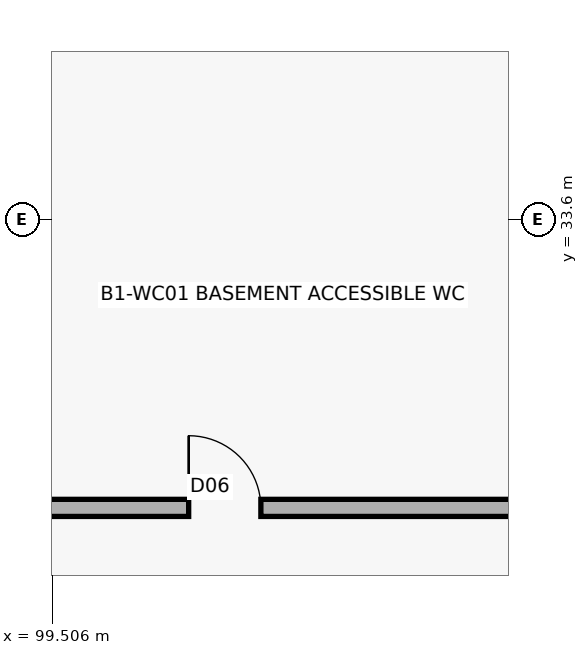
"""IFC4 building model, lengths in metres.
Left out: names, types, materials, properties, quantities, classifications, styles, units other than length and angle.
Written with IfcOpenShell. Run it as: python <this file> out.ifc"""

import sys

from ifc_helpers import new_model, si_unit, direction, frame, frame_2d, origin, place, context, subcontext, project, spatial, rectangle, extrude, element, fill, save


model = new_model("IFC4")
c1 = context("Model", 3, precision=1e-05, world=origin(), true_north=direction((0.0, 1.0)))
c2 = subcontext(c1, "Body", "Model", "MODEL_VIEW")
j1 = project(units=[si_unit("LENGTHUNIT", "METRE"), si_unit("PLANEANGLEUNIT", "RADIAN")], contexts=[c1])
p1 = place(None, origin())
s1 = spatial("IfcSite", under=j1, at=p1, CompositionType="ELEMENT")
p2 = place(p1, origin())
s2 = spatial("IfcBuilding", under=s1, at=p2, CompositionType="ELEMENT")
p3 = place(p2, frame((0.0, 0.0, -3.6)))
s3 = spatial("IfcBuildingStorey", under=s2, at=p3, CompositionType="ELEMENT", Elevation=-3.6)
p4 = place(p3, frame((67.8, 29.8, 0.0), z_axis=(0.0, 0.0, 1.0), x_axis=(1.0, 0.0, 0.0)))
e1 = element("IfcWall", 1, at=p4, inside=s3, PredefinedType="SOLIDWALL", context=c2, shape_type="SweptSolid", body=[
    extrude(rectangle(XDim=49.0, YDim=0.225, at=frame_2d((24.5, 0.0))), origin(), (0.0, 0.0, 1.0), 2.45),
])
p5 = place(p4, frame((4.2, 0.0, 0.0)))
e2 = element("IfcOpeningElement", 2, at=p5, cuts=e1, PredefinedType="OPENING", context=c2, shape_type="SweptSolid", body=[
    extrude(rectangle(XDim=1.15, YDim=2.2, at=frame_2d((0.575, 1.1))), frame((0.0, 0.123, 0.0), z_axis=(0.0, -1.0, 0.0), x_axis=(1.0, 0.0, 0.0)), (0.0, 0.0, 1.0), 0.245),
])
p6 = place(p4, frame((15.2, 0.0, 0.0)))
e3 = element("IfcOpeningElement", 3, at=p6, cuts=e1, PredefinedType="OPENING", context=c2, shape_type="SweptSolid", body=[
    extrude(rectangle(XDim=1.4, YDim=2.2, at=frame_2d((0.7, 1.1))), frame((0.0, 0.123, 0.0), z_axis=(0.0, -1.0, 0.0), x_axis=(1.0, 0.0, 0.0)), (0.0, 0.0, 1.0), 0.245),
])
p7 = place(p4, frame((26.2, 0.0, 0.0)))
e4 = element("IfcOpeningElement", 4, at=p7, cuts=e1, PredefinedType="OPENING", context=c2, shape_type="SweptSolid", body=[
    extrude(rectangle(XDim=1.15, YDim=2.2, at=frame_2d((0.575, 1.1))), frame((0.0, 0.123, 0.0), z_axis=(0.0, -1.0, 0.0), x_axis=(1.0, 0.0, 0.0)), (0.0, 0.0, 1.0), 0.245),
])
p8 = place(p4, frame((33.5, 0.0, 0.0)))
e5 = element("IfcOpeningElement", 5, at=p8, cuts=e1, PredefinedType="OPENING", context=c2, shape_type="SweptSolid", body=[
    extrude(rectangle(XDim=0.95, YDim=2.1, at=frame_2d((0.475, 1.05))), frame((0.0, 0.123, 0.0), z_axis=(0.0, -1.0, 0.0), x_axis=(1.0, 0.0, 0.0)), (0.0, 0.0, 1.0), 0.245),
])
p9 = place(p4, frame((41.5, 0.0, 0.0)))
e6 = element("IfcOpeningElement", 6, at=p9, cuts=e1, PredefinedType="OPENING", context=c2, shape_type="SweptSolid", body=[
    extrude(rectangle(XDim=1.4, YDim=2.2, at=frame_2d((0.7, 1.1))), frame((0.0, 0.123, 0.0), z_axis=(0.0, -1.0, 0.0), x_axis=(1.0, 0.0, 0.0)), (0.0, 0.0, 1.0), 0.245),
])
p10 = place(p8, origin())
e7 = element("IfcDoor", 7, at=p10, inside=s3, OperationType="SINGLE_SWING_LEFT", PredefinedType="DOOR", context=c2, shape_type="SweptSolid", body=[
    extrude(rectangle(XDim=0.95, YDim=2.1, at=frame_2d((0.475, 1.05))), frame((0.0, 0.025, 0.0), z_axis=(0.0, -1.0, 0.0), x_axis=(1.0, 0.0, 0.0)), (0.0, 0.0, 1.0), 0.05),
])
fill(e5, e7)
save(model, sys.argv[1])
